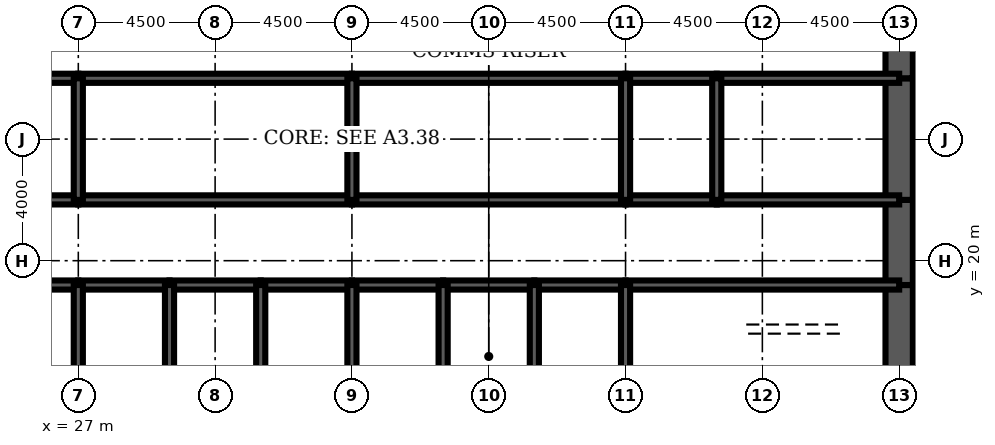
"""IFC4 building model, lengths in metres.
Left out: names, types, materials, properties, quantities, classifications, styles, units other than length and angle.
Written with IfcOpenShell. Run it as: python <this file> out.ifc"""

import sys

from ifc_helpers import new_model, si_unit, direction, frame, frame_2d, origin, place, context, subcontext, project, spatial, rectangle, extrude, element, fill, save


model = new_model("IFC4")
c1 = context("Model", 3, precision=1e-05, world=origin(), true_north=direction((0.0, 1.0)))
c2 = subcontext(c1, "Body", "Model", "MODEL_VIEW")
j1 = project(units=[si_unit("LENGTHUNIT", "METRE"), si_unit("PLANEANGLEUNIT", "RADIAN")], contexts=[c1])
p1 = place(None, origin())
s1 = spatial("IfcSite", under=j1, at=p1, CompositionType="ELEMENT")
p2 = place(p1, origin())
s2 = spatial("IfcBuilding", under=s1, at=p2, CompositionType="ELEMENT")
p3 = place(p2, frame((0.0, 0.0, 163.5)))
s3 = spatial("IfcBuildingStorey", under=s2, at=p3, CompositionType="ELEMENT", Elevation=163.5)
p4 = place(p3, frame((54.0, 16.0, 0.0), z_axis=(0.0, 0.0, 1.0), x_axis=(0.0, 1.0, 0.0)))
e1 = element("IfcWall", 1, at=p4, inside=s3, PredefinedType="SHEAR", context=c2, shape_type="SweptSolid", body=[
    extrude(rectangle(XDim=3.2, YDim=0.9, at=frame_2d((1.6, 0.0))), origin(), (0.0, 0.0, 1.0), 4.2),
])
p5 = place(p3, frame((54.0, 19.2, 0.0), z_axis=(0.0, 0.0, 1.0), x_axis=(0.0, 1.0, 0.0)))
e2 = element("IfcWall", 2, at=p5, inside=s3, PredefinedType="SHEAR", context=c2, shape_type="SweptSolid", body=[
    extrude(rectangle(XDim=2.8, YDim=0.9, at=frame_2d((1.4, 0.0))), origin(), (0.0, 0.0, 1.0), 4.2),
])
p6 = place(p5, frame((0.4, 0.0, 0.0)))
e3 = element("IfcOpeningElement", 3, at=p6, cuts=e2, PredefinedType="OPENING", context=c2, shape_type="SweptSolid", body=[
    extrude(rectangle(XDim=1.8, YDim=2.1, at=frame_2d((0.9, 1.05))), frame((0.0, 0.46, 0.0), z_axis=(0.0, -1.0, 0.0), x_axis=(1.0, 0.0, 0.0)), (0.0, 0.0, 1.0), 0.92),
])
p7 = place(p3, frame((54.0, 22.0, 0.0), z_axis=(0.0, 0.0, 1.0), x_axis=(0.0, 1.0, 0.0)))
e4 = element("IfcWall", 4, at=p7, inside=s3, PredefinedType="SHEAR", context=c2, shape_type="SweptSolid", body=[
    extrude(rectangle(XDim=4.0, YDim=0.9, at=frame_2d((2.0, 0.0))), origin(), (0.0, 0.0, 1.0), 4.2),
])
p8 = place(p3, frame((54.0, 26.0, 0.0), z_axis=(0.0, 0.0, 1.0), x_axis=(0.0, 1.0, 0.0)))
e5 = element("IfcWall", 5, at=p8, inside=s3, PredefinedType="SHEAR", context=c2, shape_type="SweptSolid", body=[
    extrude(rectangle(XDim=2.8, YDim=0.9, at=frame_2d((1.4, 0.0))), origin(), (0.0, 0.0, 1.0), 4.2),
])
p9 = place(p8, frame((0.6, 0.0, 0.0)))
e6 = element("IfcOpeningElement", 6, at=p9, cuts=e5, PredefinedType="OPENING", context=c2, shape_type="SweptSolid", body=[
    extrude(rectangle(XDim=1.8, YDim=2.1, at=frame_2d((0.9, 1.05))), frame((0.0, 0.46, 0.0), z_axis=(0.0, -1.0, 0.0), x_axis=(1.0, 0.0, 0.0)), (0.0, 0.0, 1.0), 0.92),
])
p10 = place(p3, frame((18.0, 19.2, 0.0), z_axis=(0.0, 0.0, 1.0), x_axis=(1.0, 0.0, 0.0)))
e7 = element("IfcWall", 7, at=p10, inside=s3, PredefinedType="SOLIDWALL", context=c2, shape_type="SweptSolid", body=[
    extrude(rectangle(XDim=9.0, YDim=0.3, at=frame_2d((4.5, 0.0))), origin(), (0.0, 0.0, 1.0), 4.2),
])
p11 = place(p10, frame((0.65, 0.0, 0.0)))
e8 = element("IfcOpeningElement", 8, at=p11, cuts=e7, PredefinedType="OPENING", context=c2, shape_type="SweptSolid", body=[
    extrude(rectangle(XDim=1.0, YDim=2.1, at=frame_2d((0.5, 1.05))), frame((0.0, 0.16, 0.0), z_axis=(0.0, -1.0, 0.0), x_axis=(1.0, 0.0, 0.0)), (0.0, 0.0, 1.0), 0.32),
])
p12 = place(p3, frame((27.0, 19.2, 0.0), z_axis=(0.0, 0.0, 1.0), x_axis=(1.0, 0.0, 0.0)))
e9 = element("IfcWall", 9, at=p12, inside=s3, PredefinedType="SOLIDWALL", context=c2, shape_type="SweptSolid", body=[
    extrude(rectangle(XDim=3.0, YDim=0.3, at=frame_2d((1.5, 0.0))), origin(), (0.0, 0.0, 1.0), 4.2),
])
p13 = place(p12, frame((0.95, 0.0, 0.0)))
e10 = element("IfcOpeningElement", 10, at=p13, cuts=e9, PredefinedType="OPENING", context=c2, shape_type="SweptSolid", body=[
    extrude(rectangle(XDim=1.1, YDim=2.2, at=frame_2d((0.55, 1.1))), frame((0.0, 0.16, 0.0), z_axis=(0.0, -1.0, 0.0), x_axis=(1.0, 0.0, 0.0)), (0.0, 0.0, 1.0), 0.32),
])
p14 = place(p3, frame((30.0, 19.2, 0.0), z_axis=(0.0, 0.0, 1.0), x_axis=(1.0, 0.0, 0.0)))
e11 = element("IfcWall", 11, at=p14, inside=s3, PredefinedType="SOLIDWALL", context=c2, shape_type="SweptSolid", body=[
    extrude(rectangle(XDim=3.0, YDim=0.3, at=frame_2d((1.5, 0.0))), origin(), (0.0, 0.0, 1.0), 4.2),
])
p15 = place(p14, frame((0.95, 0.0, 0.0)))
e12 = element("IfcOpeningElement", 12, at=p15, cuts=e11, PredefinedType="OPENING", context=c2, shape_type="SweptSolid", body=[
    extrude(rectangle(XDim=1.1, YDim=2.2, at=frame_2d((0.55, 1.1))), frame((0.0, 0.16, 0.0), z_axis=(0.0, -1.0, 0.0), x_axis=(1.0, 0.0, 0.0)), (0.0, 0.0, 1.0), 0.32),
])
p16 = place(p3, frame((33.0, 19.2, 0.0), z_axis=(0.0, 0.0, 1.0), x_axis=(1.0, 0.0, 0.0)))
e13 = element("IfcWall", 13, at=p16, inside=s3, PredefinedType="SOLIDWALL", context=c2, shape_type="SweptSolid", body=[
    extrude(rectangle(XDim=3.0, YDim=0.3, at=frame_2d((1.5, 0.0))), origin(), (0.0, 0.0, 1.0), 4.2),
])
p17 = place(p16, frame((0.95, 0.0, 0.0)))
e14 = element("IfcOpeningElement", 14, at=p17, cuts=e13, PredefinedType="OPENING", context=c2, shape_type="SweptSolid", body=[
    extrude(rectangle(XDim=1.1, YDim=2.2, at=frame_2d((0.55, 1.1))), frame((0.0, 0.16, 0.0), z_axis=(0.0, -1.0, 0.0), x_axis=(1.0, 0.0, 0.0)), (0.0, 0.0, 1.0), 0.32),
])
p18 = place(p3, frame((36.0, 19.2, 0.0), z_axis=(0.0, 0.0, 1.0), x_axis=(1.0, 0.0, 0.0)))
e15 = element("IfcWall", 15, at=p18, inside=s3, PredefinedType="SOLIDWALL", context=c2, shape_type="SweptSolid", body=[
    extrude(rectangle(XDim=3.0, YDim=0.3, at=frame_2d((1.5, 0.0))), origin(), (0.0, 0.0, 1.0), 4.2),
])
p19 = place(p18, frame((0.95, 0.0, 0.0)))
e16 = element("IfcOpeningElement", 16, at=p19, cuts=e15, PredefinedType="OPENING", context=c2, shape_type="SweptSolid", body=[
    extrude(rectangle(XDim=1.1, YDim=2.2, at=frame_2d((0.55, 1.1))), frame((0.0, 0.16, 0.0), z_axis=(0.0, -1.0, 0.0), x_axis=(1.0, 0.0, 0.0)), (0.0, 0.0, 1.0), 0.32),
])
p20 = place(p3, frame((39.0, 19.2, 0.0), z_axis=(0.0, 0.0, 1.0), x_axis=(1.0, 0.0, 0.0)))
e17 = element("IfcWall", 17, at=p20, inside=s3, PredefinedType="SOLIDWALL", context=c2, shape_type="SweptSolid", body=[
    extrude(rectangle(XDim=3.0, YDim=0.3, at=frame_2d((1.5, 0.0))), origin(), (0.0, 0.0, 1.0), 4.2),
])
p21 = place(p20, frame((1.0, 0.0, 0.0)))
e18 = element("IfcOpeningElement", 18, at=p21, cuts=e17, PredefinedType="OPENING", context=c2, shape_type="SweptSolid", body=[
    extrude(rectangle(XDim=1.0, YDim=2.1, at=frame_2d((0.5, 1.05))), frame((0.0, 0.16, 0.0), z_axis=(0.0, -1.0, 0.0), x_axis=(1.0, 0.0, 0.0)), (0.0, 0.0, 1.0), 0.32),
])
p22 = place(p3, frame((42.0, 19.2, 0.0), z_axis=(0.0, 0.0, 1.0), x_axis=(1.0, 0.0, 0.0)))
e19 = element("IfcWall", 19, at=p22, inside=s3, PredefinedType="SOLIDWALL", context=c2, shape_type="SweptSolid", body=[
    extrude(rectangle(XDim=3.0, YDim=0.3, at=frame_2d((1.5, 0.0))), origin(), (0.0, 0.0, 1.0), 4.2),
])
p23 = place(p3, frame((45.0, 19.2, 0.0), z_axis=(0.0, 0.0, 1.0), x_axis=(1.0, 0.0, 0.0)))
e20 = element("IfcWall", 20, at=p23, inside=s3, PredefinedType="SOLIDWALL", context=c2, shape_type="SweptSolid", body=[
    extrude(rectangle(XDim=9.0, YDim=0.3, at=frame_2d((4.5, 0.0))), origin(), (0.0, 0.0, 1.0), 4.2),
])
p24 = place(p23, frame((7.35, 0.0, 0.0)))
e21 = element("IfcOpeningElement", 21, at=p24, cuts=e20, PredefinedType="OPENING", context=c2, shape_type="SweptSolid", body=[
    extrude(rectangle(XDim=1.0, YDim=2.1, at=frame_2d((0.5, 1.05))), frame((0.0, 0.16, 0.0), z_axis=(0.0, -1.0, 0.0), x_axis=(1.0, 0.0, 0.0)), (0.0, 0.0, 1.0), 0.32),
])
p25 = place(p3, frame((24.0, 22.0, 0.0), z_axis=(0.0, 0.0, 1.0), x_axis=(1.0, 0.0, 0.0)))
e22 = element("IfcWall", 22, at=p25, inside=s3, PredefinedType="SOLIDWALL", context=c2, shape_type="SweptSolid", body=[
    extrude(rectangle(XDim=3.0, YDim=0.3, at=frame_2d((1.5, 0.0))), origin(), (0.0, 0.0, 1.0), 4.2),
])
p26 = place(p25, frame((1.0, 0.0, 0.0)))
e23 = element("IfcOpeningElement", 23, at=p26, cuts=e22, PredefinedType="OPENING", context=c2, shape_type="SweptSolid", body=[
    extrude(rectangle(XDim=1.0, YDim=2.1, at=frame_2d((0.5, 1.05))), frame((0.0, 0.16, 0.0), z_axis=(0.0, -1.0, 0.0), x_axis=(1.0, 0.0, 0.0)), (0.0, 0.0, 1.0), 0.32),
])
p27 = place(p3, frame((27.0, 22.0, 0.0), z_axis=(0.0, 0.0, 1.0), x_axis=(1.0, 0.0, 0.0)))
e24 = element("IfcWall", 24, at=p27, inside=s3, PredefinedType="SOLIDWALL", context=c2, shape_type="SweptSolid", body=[
    extrude(rectangle(XDim=9.0, YDim=0.3, at=frame_2d((4.5, 0.0))), origin(), (0.0, 0.0, 1.0), 4.2),
])
p28 = place(p27, frame((4.0, 0.0, 0.0)))
e25 = element("IfcOpeningElement", 25, at=p28, cuts=e24, PredefinedType="OPENING", context=c2, shape_type="SweptSolid", body=[
    extrude(rectangle(XDim=1.0, YDim=2.1, at=frame_2d((0.5, 1.05))), frame((0.0, 0.16, 0.0), z_axis=(0.0, -1.0, 0.0), x_axis=(1.0, 0.0, 0.0)), (0.0, 0.0, 1.0), 0.32),
])
p29 = place(p3, frame((36.0, 22.0, 0.0), z_axis=(0.0, 0.0, 1.0), x_axis=(1.0, 0.0, 0.0)))
e26 = element("IfcWall", 26, at=p29, inside=s3, PredefinedType="SOLIDWALL", context=c2, shape_type="SweptSolid", body=[
    extrude(rectangle(XDim=9.0, YDim=0.3, at=frame_2d((4.5, 0.0))), origin(), (0.0, 0.0, 1.0), 4.2),
])
p30 = place(p29, frame((4.0, 0.0, 0.0)))
e27 = element("IfcOpeningElement", 27, at=p30, cuts=e26, PredefinedType="OPENING", context=c2, shape_type="SweptSolid", body=[
    extrude(rectangle(XDim=1.0, YDim=2.1, at=frame_2d((0.5, 1.05))), frame((0.0, 0.16, 0.0), z_axis=(0.0, -1.0, 0.0), x_axis=(1.0, 0.0, 0.0)), (0.0, 0.0, 1.0), 0.32),
])
p31 = place(p3, frame((45.0, 22.0, 0.0), z_axis=(0.0, 0.0, 1.0), x_axis=(1.0, 0.0, 0.0)))
e28 = element("IfcWall", 28, at=p31, inside=s3, PredefinedType="SOLIDWALL", context=c2, shape_type="SweptSolid", body=[
    extrude(rectangle(XDim=3.0, YDim=0.3, at=frame_2d((1.5, 0.0))), origin(), (0.0, 0.0, 1.0), 4.2),
])
p32 = place(p31, frame((1.0, 0.0, 0.0)))
e29 = element("IfcOpeningElement", 29, at=p32, cuts=e28, PredefinedType="OPENING", context=c2, shape_type="SweptSolid", body=[
    extrude(rectangle(XDim=1.0, YDim=2.1, at=frame_2d((0.5, 1.05))), frame((0.0, 0.16, 0.0), z_axis=(0.0, -1.0, 0.0), x_axis=(1.0, 0.0, 0.0)), (0.0, 0.0, 1.0), 0.32),
])
p33 = place(p3, frame((48.0, 22.0, 0.0), z_axis=(0.0, 0.0, 1.0), x_axis=(1.0, 0.0, 0.0)))
e30 = element("IfcWall", 30, at=p33, inside=s3, PredefinedType="SOLIDWALL", context=c2, shape_type="SweptSolid", body=[
    extrude(rectangle(XDim=6.0, YDim=0.3, at=frame_2d((3.0, 0.0))), origin(), (0.0, 0.0, 1.0), 4.2),
])
p34 = place(p33, frame((2.0, 0.0, 0.0)))
e31 = element("IfcOpeningElement", 31, at=p34, cuts=e30, PredefinedType="OPENING", context=c2, shape_type="SweptSolid", body=[
    extrude(rectangle(XDim=1.0, YDim=2.1, at=frame_2d((0.5, 1.05))), frame((0.0, 0.16, 0.0), z_axis=(0.0, -1.0, 0.0), x_axis=(1.0, 0.0, 0.0)), (0.0, 0.0, 1.0), 0.32),
])
p35 = place(p33, frame((4.3, 0.0, 0.0)))
e32 = element("IfcOpeningElement", 32, at=p35, cuts=e30, PredefinedType="OPENING", context=c2, shape_type="SweptSolid", body=[
    extrude(rectangle(XDim=1.0, YDim=2.1, at=frame_2d((0.5, 1.05))), frame((0.0, 0.16, 0.0), z_axis=(0.0, -1.0, 0.0), x_axis=(1.0, 0.0, 0.0)), (0.0, 0.0, 1.0), 0.32),
])
p36 = place(p3, frame((24.0, 26.0, 0.0), z_axis=(0.0, 0.0, 1.0), x_axis=(1.0, 0.0, 0.0)))
e33 = element("IfcWall", 33, at=p36, inside=s3, PredefinedType="SOLIDWALL", context=c2, shape_type="SweptSolid", body=[
    extrude(rectangle(XDim=3.0, YDim=0.3, at=frame_2d((1.5, 0.0))), origin(), (0.0, 0.0, 1.0), 4.2),
])
for number, where, z_axis, x_axis in (
    (34, (27.0, 26.0, 0.0), (0.0, 0.0, 1.0), (1.0, 0.0, 0.0)),
    (35, (36.0, 26.0, 0.0), (0.0, 0.0, 1.0), (1.0, 0.0, 0.0)),
):
    element("IfcWall", number, at=place(p3, frame(where, z_axis=z_axis, x_axis=x_axis)), inside=s3, PredefinedType="SOLIDWALL", context=c2, shape_type="SweptSolid", body=[
        extrude(rectangle(XDim=9.0, YDim=0.3, at=frame_2d((4.5, 0.0))), origin(), (0.0, 0.0, 1.0), 4.2),
    ])
p37 = place(p3, frame((45.0, 26.0, 0.0), z_axis=(0.0, 0.0, 1.0), x_axis=(1.0, 0.0, 0.0)))
e36 = element("IfcWall", 36, at=p37, inside=s3, PredefinedType="SOLIDWALL", context=c2, shape_type="SweptSolid", body=[
    extrude(rectangle(XDim=3.0, YDim=0.3, at=frame_2d((1.5, 0.0))), origin(), (0.0, 0.0, 1.0), 4.2),
])
p38 = place(p3, frame((48.0, 26.0, 0.0), z_axis=(0.0, 0.0, 1.0), x_axis=(1.0, 0.0, 0.0)))
e37 = element("IfcWall", 37, at=p38, inside=s3, PredefinedType="SOLIDWALL", context=c2, shape_type="SweptSolid", body=[
    extrude(rectangle(XDim=6.0, YDim=0.3, at=frame_2d((3.0, 0.0))), origin(), (0.0, 0.0, 1.0), 4.2),
])
for number, where, z_axis, x_axis in (
    (38, (27.0, 16.0, 0.0), (0.0, 0.0, 1.0), (0.0, 1.0, 0.0)),
    (39, (30.0, 16.0, 0.0), (0.0, 0.0, 1.0), (0.0, 1.0, 0.0)),
    (40, (33.0, 16.0, 0.0), (0.0, 0.0, 1.0), (0.0, 1.0, 0.0)),
    (41, (36.0, 16.0, 0.0), (0.0, 0.0, 1.0), (0.0, 1.0, 0.0)),
    (42, (39.0, 16.0, 0.0), (0.0, 0.0, 1.0), (0.0, 1.0, 0.0)),
    (43, (42.0, 16.0, 0.0), (0.0, 0.0, 1.0), (0.0, 1.0, 0.0)),
    (44, (45.0, 16.0, 0.0), (0.0, 0.0, 1.0), (0.0, 1.0, 0.0)),
):
    element("IfcWall", number, at=place(p3, frame(where, z_axis=z_axis, x_axis=x_axis)), inside=s3, PredefinedType="SOLIDWALL", context=c2, shape_type="SweptSolid", body=[
        extrude(rectangle(XDim=3.2, YDim=0.3, at=frame_2d((1.6, 0.0))), origin(), (0.0, 0.0, 1.0), 4.2),
    ])
for number, where, z_axis, x_axis in (
    (45, (27.0, 22.0, 0.0), (0.0, 0.0, 1.0), (0.0, 1.0, 0.0)),
    (46, (36.0, 22.0, 0.0), (0.0, 0.0, 1.0), (0.0, 1.0, 0.0)),
    (47, (45.0, 22.0, 0.0), (0.0, 0.0, 1.0), (0.0, 1.0, 0.0)),
    (48, (48.0, 22.0, 0.0), (0.0, 0.0, 1.0), (0.0, 1.0, 0.0)),
):
    element("IfcWall", number, at=place(p3, frame(where, z_axis=z_axis, x_axis=x_axis)), inside=s3, PredefinedType="SOLIDWALL", context=c2, shape_type="SweptSolid", body=[
        extrude(rectangle(XDim=4.0, YDim=0.3, at=frame_2d((2.0, 0.0))), origin(), (0.0, 0.0, 1.0), 4.2),
    ])
p39 = place(p3, frame((39.15, 17.4, 0.0), z_axis=(0.0, 0.0, 1.0), x_axis=(1.0, 0.0, 0.0)))
e49 = element("IfcWall", 49, at=p39, inside=s3, PredefinedType="SOLIDWALL", context=c2, shape_type="SweptSolid", body=[
    extrude(rectangle(XDim=2.7, YDim=0.3, at=frame_2d((1.35, 0.0))), origin(), (0.0, 0.0, 1.0), 4.04),
])
p40 = place(p39, frame((0.85, 0.0, 0.0)))
e50 = element("IfcOpeningElement", 50, at=p40, cuts=e49, PredefinedType="OPENING", context=c2, shape_type="SweptSolid", body=[
    extrude(rectangle(XDim=1.0, YDim=2.1, at=frame_2d((0.5, 1.05))), frame((0.0, 0.16, 0.0), z_axis=(0.0, -1.0, 0.0), x_axis=(1.0, 0.0, 0.0)), (0.0, 0.0, 1.0), 0.32),
])
p41 = place(p3, frame((39.0, 22.15, 0.0), z_axis=(0.0, 0.0, 1.0), x_axis=(0.0, 1.0, 0.0)))
e51 = element("IfcWall", 51, at=p41, inside=s3, PredefinedType="PARTITIONING", context=c2, shape_type="SweptSolid", body=[
    extrude(rectangle(XDim=3.7, YDim=0.15, at=frame_2d((1.85, 0.0))), origin(), (0.0, 0.0, 1.0), 3.0),
])
p42 = place(p41, frame((2.2, 0.0, 0.0)))
e52 = element("IfcOpeningElement", 52, at=p42, cuts=e51, PredefinedType="OPENING", context=c2, shape_type="SweptSolid", body=[
    extrude(rectangle(XDim=1.0, YDim=2.1, at=frame_2d((0.5, 1.05))), frame((0.0, 0.085, 0.0), z_axis=(0.0, -1.0, 0.0), x_axis=(1.0, 0.0, 0.0)), (0.0, 0.0, 1.0), 0.17),
])
p43 = place(p3, frame((51.975, 22.15, 0.0), z_axis=(0.0, 0.0, 1.0), x_axis=(0.0, 1.0, 0.0)))
e53 = element("IfcWall", 53, at=p43, inside=s3, PredefinedType="PARTITIONING", context=c2, shape_type="SweptSolid", body=[
    extrude(rectangle(XDim=3.7, YDim=0.15, at=frame_2d((1.85, 0.0))), origin(), (0.0, 0.0, 1.0), 3.0),
])
p44 = place(p3, frame((48.6, 19.35, 0.0), z_axis=(0.0, 0.0, 1.0), x_axis=(0.0, 1.0, 0.0)))
e54 = element("IfcWall", 54, at=p44, inside=s3, PredefinedType="PARTITIONING", context=c2, shape_type="SweptSolid", body=[
    extrude(rectangle(XDim=2.5, YDim=0.15, at=frame_2d((1.25, 0.0))), origin(), (0.0, 0.0, 1.0), 3.0),
])
p45 = place(p44, frame((1.15, 0.0, 0.0)))
e55 = element("IfcOpeningElement", 55, at=p45, cuts=e54, PredefinedType="OPENING", context=c2, shape_type="SweptSolid", body=[
    extrude(rectangle(XDim=1.0, YDim=2.1, at=frame_2d((0.5, 1.05))), frame((0.0, 0.085, 0.0), z_axis=(0.0, -1.0, 0.0), x_axis=(1.0, 0.0, 0.0)), (0.0, 0.0, 1.0), 0.17),
])
p46 = place(p40, origin())
e56 = element("IfcDoor", 56, at=p46, inside=s3, OperationType="SINGLE_SWING_LEFT", PredefinedType="DOOR", context=c2, shape_type="SweptSolid", body=[
    extrude(rectangle(XDim=1.0, YDim=2.1, at=frame_2d((0.5, 1.05))), frame((0.0, 0.025, 0.0), z_axis=(0.0, -1.0, 0.0), x_axis=(1.0, 0.0, 0.0)), (0.0, 0.0, 1.0), 0.05),
])
fill(e50, e56)
p47 = place(p42, origin())
e57 = element("IfcDoor", 57, at=p47, inside=s3, OperationType="SINGLE_SWING_RIGHT", PredefinedType="DOOR", context=c2, shape_type="SweptSolid", body=[
    extrude(rectangle(XDim=1.0, YDim=2.1, at=frame_2d((0.5, 1.05))), frame((0.0, 0.025, 0.0), z_axis=(0.0, -1.0, 0.0), x_axis=(1.0, 0.0, 0.0)), (0.0, 0.0, 1.0), 0.05),
])
fill(e52, e57)
p48 = place(p45, origin())
e58 = element("IfcDoor", 58, at=p48, inside=s3, OperationType="SINGLE_SWING_RIGHT", PredefinedType="DOOR", context=c2, shape_type="SweptSolid", body=[
    extrude(rectangle(XDim=1.0, YDim=2.1, at=frame_2d((0.5, 1.05))), frame((0.0, 0.025, 0.0), z_axis=(0.0, -1.0, 0.0), x_axis=(1.0, 0.0, 0.0)), (0.0, 0.0, 1.0), 0.05),
])
fill(e55, e58)
p49 = place(p13, origin())
e59 = element("IfcDoor", 59, at=p49, inside=s3, OperationType="DOUBLE_DOOR_SLIDING", PredefinedType="USERDEFINED", context=c2, shape_type="SweptSolid", body=[
    extrude(rectangle(XDim=1.1, YDim=2.2, at=frame_2d((0.55, 1.1))), frame((0.0, 0.025, 0.0), z_axis=(0.0, -1.0, 0.0), x_axis=(1.0, 0.0, 0.0)), (0.0, 0.0, 1.0), 0.05),
])
fill(e10, e59)
p50 = place(p15, origin())
e60 = element("IfcDoor", 60, at=p50, inside=s3, OperationType="DOUBLE_DOOR_SLIDING", PredefinedType="USERDEFINED", context=c2, shape_type="SweptSolid", body=[
    extrude(rectangle(XDim=1.1, YDim=2.2, at=frame_2d((0.55, 1.1))), frame((0.0, 0.025, 0.0), z_axis=(0.0, -1.0, 0.0), x_axis=(1.0, 0.0, 0.0)), (0.0, 0.0, 1.0), 0.05),
])
fill(e12, e60)
p51 = place(p17, origin())
e61 = element("IfcDoor", 61, at=p51, inside=s3, OperationType="DOUBLE_DOOR_SLIDING", PredefinedType="USERDEFINED", context=c2, shape_type="SweptSolid", body=[
    extrude(rectangle(XDim=1.1, YDim=2.2, at=frame_2d((0.55, 1.1))), frame((0.0, 0.025, 0.0), z_axis=(0.0, -1.0, 0.0), x_axis=(1.0, 0.0, 0.0)), (0.0, 0.0, 1.0), 0.05),
])
fill(e14, e61)
p52 = place(p19, origin())
e62 = element("IfcDoor", 62, at=p52, inside=s3, OperationType="DOUBLE_DOOR_SLIDING", PredefinedType="USERDEFINED", context=c2, shape_type="SweptSolid", body=[
    extrude(rectangle(XDim=1.1, YDim=2.2, at=frame_2d((0.55, 1.1))), frame((0.0, 0.025, 0.0), z_axis=(0.0, -1.0, 0.0), x_axis=(1.0, 0.0, 0.0)), (0.0, 0.0, 1.0), 0.05),
])
fill(e16, e62)
p53 = place(p24, origin())
e63 = element("IfcDoor", 63, at=p53, inside=s3, OperationType="SINGLE_SWING_RIGHT", PredefinedType="DOOR", context=c2, shape_type="SweptSolid", body=[
    extrude(rectangle(XDim=1.0, YDim=2.1, at=frame_2d((0.5, 1.05))), frame((0.0, 0.025, 0.0), z_axis=(0.0, -1.0, 0.0), x_axis=(1.0, 0.0, 0.0)), (0.0, 0.0, 1.0), 0.05),
])
fill(e21, e63)
p54 = place(p6, origin())
e64 = element("IfcDoor", 64, at=p54, inside=s3, OperationType="SINGLE_SWING_LEFT", PredefinedType="DOOR", context=c2, shape_type="SweptSolid", body=[
    extrude(rectangle(XDim=1.8, YDim=2.1, at=frame_2d((0.9, 1.05))), frame((0.0, 0.45, 0.0), z_axis=(0.0, -1.0, 0.0), x_axis=(1.0, 0.0, 0.0)), (0.0, 0.0, 1.0), 0.899),
])
fill(e3, e64)
p55 = place(p9, origin())
e65 = element("IfcDoor", 65, at=p55, inside=s3, OperationType="SINGLE_SWING_LEFT", PredefinedType="DOOR", context=c2, shape_type="SweptSolid", body=[
    extrude(rectangle(XDim=1.8, YDim=2.1, at=frame_2d((0.9, 1.05))), frame((0.0, 0.45, 0.0), z_axis=(0.0, -1.0, 0.0), x_axis=(1.0, 0.0, 0.0)), (0.0, 0.0, 1.0), 0.899),
])
fill(e6, e65)
p56 = place(p28, origin())
e66 = element("IfcDoor", 66, at=p56, inside=s3, OperationType="SINGLE_SWING_LEFT", PredefinedType="DOOR", context=c2, shape_type="SweptSolid", body=[
    extrude(rectangle(XDim=1.0, YDim=2.1, at=frame_2d((0.5, 1.05))), frame((0.0, 0.025, 0.0), z_axis=(0.0, -1.0, 0.0), x_axis=(1.0, 0.0, 0.0)), (0.0, 0.0, 1.0), 0.05),
])
fill(e25, e66)
p57 = place(p30, origin())
e67 = element("IfcDoor", 67, at=p57, inside=s3, OperationType="SINGLE_SWING_LEFT", PredefinedType="DOOR", context=c2, shape_type="SweptSolid", body=[
    extrude(rectangle(XDim=1.0, YDim=2.1, at=frame_2d((0.5, 1.05))), frame((0.0, 0.025, 0.0), z_axis=(0.0, -1.0, 0.0), x_axis=(1.0, 0.0, 0.0)), (0.0, 0.0, 1.0), 0.05),
])
fill(e27, e67)
p58 = place(p32, origin())
e68 = element("IfcDoor", 68, at=p58, inside=s3, OperationType="SINGLE_SWING_LEFT", PredefinedType="DOOR", context=c2, shape_type="SweptSolid", body=[
    extrude(rectangle(XDim=1.0, YDim=2.1, at=frame_2d((0.5, 1.05))), frame((0.0, 0.025, 0.0), z_axis=(0.0, -1.0, 0.0), x_axis=(1.0, 0.0, 0.0)), (0.0, 0.0, 1.0), 0.05),
])
fill(e29, e68)
p59 = place(p34, origin())
e69 = element("IfcDoor", 69, at=p59, inside=s3, OperationType="SINGLE_SWING_LEFT", PredefinedType="DOOR", context=c2, shape_type="SweptSolid", body=[
    extrude(rectangle(XDim=1.0, YDim=2.1, at=frame_2d((0.5, 1.05))), frame((0.0, 0.025, 0.0), z_axis=(0.0, -1.0, 0.0), x_axis=(1.0, 0.0, 0.0)), (0.0, 0.0, 1.0), 0.05),
])
fill(e31, e69)
p60 = place(p35, origin())
e70 = element("IfcDoor", 70, at=p60, inside=s3, OperationType="SINGLE_SWING_RIGHT", PredefinedType="DOOR", context=c2, shape_type="SweptSolid", body=[
    extrude(rectangle(XDim=1.0, YDim=2.1, at=frame_2d((0.5, 1.05))), frame((0.0, 0.025, 0.0), z_axis=(0.0, -1.0, 0.0), x_axis=(1.0, 0.0, 0.0)), (0.0, 0.0, 1.0), 0.05),
])
fill(e32, e70)
p61 = place(p21, origin())
e71 = element("IfcDoor", 71, at=p61, inside=s3, OperationType="SINGLE_SWING_LEFT", PredefinedType="DOOR", context=c2, shape_type="SweptSolid", body=[
    extrude(rectangle(XDim=1.0, YDim=2.1, at=frame_2d((0.5, 1.05))), frame((0.0, 0.025, 0.0), z_axis=(0.0, -1.0, 0.0), x_axis=(1.0, 0.0, 0.0)), (0.0, 0.0, 1.0), 0.05),
])
fill(e18, e71)
save(model, sys.argv[1])
